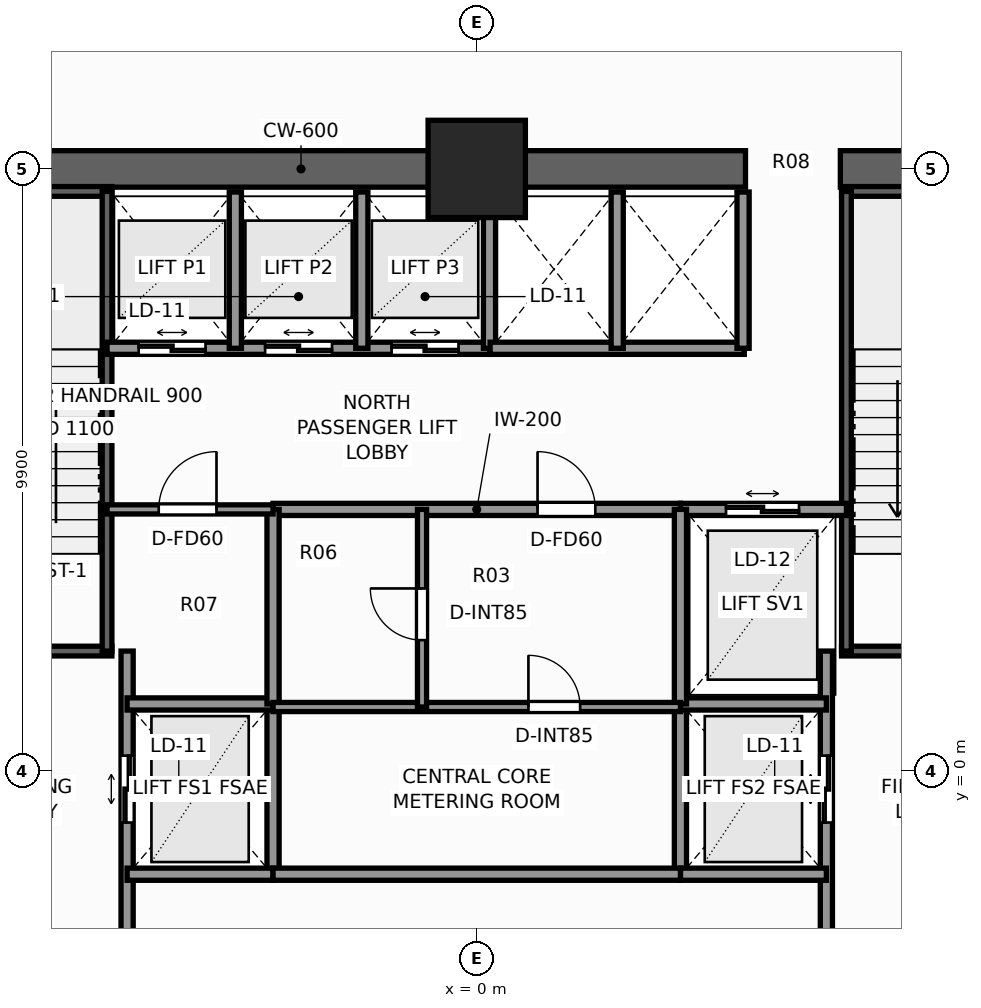
"""IFC4 building model, lengths in metres.
Left out: names, types, materials, properties, quantities, classifications, styles, units other than length and angle.
Written with IfcOpenShell. Run it as: python <this file> out.ifc"""

import sys

from ifc_helpers import new_model, si_unit, direction, frame, frame_2d, origin, origin_2d, place, context, subcontext, project, spatial, rectangle, extrude, element, fill, save


model = new_model("IFC4")
c1 = context("Model", 3, precision=1e-05, world=origin(), true_north=direction((0.0, 1.0)))
c2 = subcontext(c1, "Body", "Model", "MODEL_VIEW")
j1 = project(units=[si_unit("LENGTHUNIT", "METRE"), si_unit("PLANEANGLEUNIT", "RADIAN")], contexts=[c1])
p1 = place(None, origin())
s1 = spatial("IfcSite", under=j1, at=p1, CompositionType="ELEMENT")
p2 = place(p1, origin())
s2 = spatial("IfcBuilding", under=s1, at=p2, CompositionType="ELEMENT")
p3 = place(p2, frame((0.0, 0.0, 5.5)))
s3 = spatial("IfcBuildingStorey", under=s2, at=p3, CompositionType="ELEMENT", Elevation=5.5)
p4 = place(p3, frame((-10.2, 9.9, 0.0), z_axis=(0.0, 0.0, 1.0), x_axis=(1.0, 0.0, 0.0)))
e1 = element("IfcWall", 1, at=p4, inside=s3, PredefinedType="SHEAR", context=c2, shape_type="SweptSolid", body=[
    extrude(rectangle(XDim=14.62, YDim=0.6, at=frame_2d((7.31, 0.0))), origin(), (0.0, 0.0, 1.0), 4.5),
])
p5 = place(p3, frame((5.98, 9.9, 0.0), z_axis=(0.0, 0.0, 1.0), x_axis=(1.0, 0.0, 0.0)))
e2 = element("IfcWall", 2, at=p5, inside=s3, PredefinedType="SHEAR", context=c2, shape_type="SweptSolid", body=[
    extrude(rectangle(XDim=4.22, YDim=0.6, at=frame_2d((2.11, 0.0))), origin(), (0.0, 0.0, 1.0), 4.5),
])
p6 = place(p3, frame((0.0, 9.9, 0.0), z_axis=(0.0, 0.0, 1.0), x_axis=(1.0, 0.0, 0.0)))
e3 = element("IfcColumn", 3, at=p6, inside=s3, PredefinedType="COLUMN", context=c2, shape_type="SweptSolid", body=[
    extrude(rectangle(XDim=1.6, YDim=1.6, at=origin_2d()), origin(), (0.0, 0.0, 1.0), 4.5),
])
p7 = place(p3, frame((-9.52, 1.97, 0.0), z_axis=(0.0, 0.0, 1.0), x_axis=(1.0, 0.0, 0.0)))
e4 = element("IfcWall", 4, at=p7, inside=s3, PredefinedType="SHEAR", context=c2, shape_type="SweptSolid", body=[
    extrude(rectangle(XDim=3.52, YDim=0.16, at=frame_2d((1.76, 0.0))), origin(), (0.0, 0.0, 1.0), 4.5),
])
p8 = place(p7, frame((1.15, 0.0, 0.0)))
e5 = element("IfcOpeningElement", 5, at=p8, cuts=e4, PredefinedType="OPENING", context=c2, shape_type="SweptSolid", body=[
    extrude(rectangle(XDim=1.1, YDim=2.2, at=frame_2d((0.55, 1.1))), frame((0.0, 0.09, 0.0), z_axis=(0.0, -1.0, 0.0), x_axis=(1.0, 0.0, 0.0)), (0.0, 0.0, 1.0), 0.18),
])
p9 = place(p3, frame((-9.52, 9.53, 0.0), z_axis=(0.0, 0.0, 1.0), x_axis=(1.0, 0.0, 0.0)))
e6 = element("IfcWall", 6, at=p9, inside=s3, PredefinedType="SHEAR", context=c2, shape_type="SweptSolid", body=[
    extrude(rectangle(XDim=3.52, YDim=0.16, at=frame_2d((1.76, 0.0))), origin(), (0.0, 0.0, 1.0), 4.5),
])
p10 = place(p3, frame((-6.08, 1.97, 0.0), z_axis=(0.0, 0.0, 1.0), x_axis=(0.0, 1.0, 0.0)))
e7 = element("IfcWall", 7, at=p10, inside=s3, PredefinedType="SHEAR", context=c2, shape_type="SweptSolid", body=[
    extrude(rectangle(XDim=7.56, YDim=0.16, at=frame_2d((3.78, 0.0))), origin(), (0.0, 0.0, 1.0), 4.5),
])
p11 = place(p3, frame((6.0, 1.97, 0.0), z_axis=(0.0, 0.0, 1.0), x_axis=(1.0, 0.0, 0.0)))
e8 = element("IfcWall", 8, at=p11, inside=s3, PredefinedType="SHEAR", context=c2, shape_type="SweptSolid", body=[
    extrude(rectangle(XDim=3.52, YDim=0.16, at=frame_2d((1.76, 0.0))), origin(), (0.0, 0.0, 1.0), 4.5),
])
p12 = place(p11, frame((1.15, 0.0, 0.0)))
e9 = element("IfcOpeningElement", 9, at=p12, cuts=e8, PredefinedType="OPENING", context=c2, shape_type="SweptSolid", body=[
    extrude(rectangle(XDim=1.1, YDim=2.2, at=frame_2d((0.55, 1.1))), frame((0.0, 0.09, 0.0), z_axis=(0.0, -1.0, 0.0), x_axis=(1.0, 0.0, 0.0)), (0.0, 0.0, 1.0), 0.18),
])
p13 = place(p3, frame((6.0, 9.53, 0.0), z_axis=(0.0, 0.0, 1.0), x_axis=(1.0, 0.0, 0.0)))
e10 = element("IfcWall", 10, at=p13, inside=s3, PredefinedType="SHEAR", context=c2, shape_type="SweptSolid", body=[
    extrude(rectangle(XDim=3.52, YDim=0.16, at=frame_2d((1.76, 0.0))), origin(), (0.0, 0.0, 1.0), 4.5),
])
p14 = place(p3, frame((6.08, 1.97, 0.0), z_axis=(0.0, 0.0, 1.0), x_axis=(0.0, 1.0, 0.0)))
e11 = element("IfcWall", 11, at=p14, inside=s3, PredefinedType="SHEAR", context=c2, shape_type="SweptSolid", body=[
    extrude(rectangle(XDim=7.56, YDim=0.16, at=frame_2d((3.78, 0.0))), origin(), (0.0, 0.0, 1.0), 4.5),
])
p15 = place(p3, frame((-5.75, -3.6, 0.0), z_axis=(0.0, 0.0, 1.0), x_axis=(0.0, 1.0, 0.0)))
e12 = element("IfcWall", 12, at=p15, inside=s3, PredefinedType="SOLIDWALL", context=c2, shape_type="SweptSolid", body=[
    extrude(rectangle(XDim=5.57, YDim=0.2, at=frame_2d((2.785, 0.0))), origin(), (0.0, 0.0, 1.0), 4.22),
])
p16 = place(p15, frame((2.75, 0.0, 0.0)))
e13 = element("IfcOpeningElement", 13, at=p16, cuts=e12, PredefinedType="OPENING", context=c2, shape_type="SweptSolid", body=[
    extrude(rectangle(XDim=1.1, YDim=2.2, at=frame_2d((0.55, 1.1))), frame((0.0, 0.11, 0.0), z_axis=(0.0, -1.0, 0.0), x_axis=(1.0, 0.0, 0.0)), (0.0, 0.0, 1.0), 0.22),
])
p17 = place(p3, frame((-3.35, -1.7, 0.0), z_axis=(0.0, 0.0, 1.0), x_axis=(0.0, 1.0, 0.0)))
e14 = element("IfcWall", 14, at=p17, inside=s3, PredefinedType="SOLIDWALL", context=c2, shape_type="SweptSolid", body=[
    extrude(rectangle(XDim=2.8, YDim=0.2, at=frame_2d((1.4, 0.0))), origin(), (0.0, 0.0, 1.0), 4.22),
])
for number, where, z_axis, x_axis in (
    (15, (-5.75, -1.7, 0.0), (0.0, 0.0, 1.0), (1.0, 0.0, 0.0)),
    (16, (-5.75, 1.1, 0.0), (0.0, 0.0, 1.0), (1.0, 0.0, 0.0)),
):
    element("IfcWall", number, at=place(p3, frame(where, z_axis=z_axis, x_axis=x_axis)), inside=s3, PredefinedType="SOLIDWALL", context=c2, shape_type="SweptSolid", body=[
        extrude(rectangle(XDim=2.4, YDim=0.2, at=frame_2d((1.2, 0.0))), origin(), (0.0, 0.0, 1.0), 4.22),
    ])
p18 = place(p3, frame((5.75, -3.6, 0.0), z_axis=(0.0, 0.0, 1.0), x_axis=(0.0, 1.0, 0.0)))
e17 = element("IfcWall", 17, at=p18, inside=s3, PredefinedType="SOLIDWALL", context=c2, shape_type="SweptSolid", body=[
    extrude(rectangle(XDim=5.57, YDim=0.2, at=frame_2d((2.785, 0.0))), origin(), (0.0, 0.0, 1.0), 4.22),
])
p19 = place(p18, frame((2.75, 0.0, 0.0)))
e18 = element("IfcOpeningElement", 18, at=p19, cuts=e17, PredefinedType="OPENING", context=c2, shape_type="SweptSolid", body=[
    extrude(rectangle(XDim=1.1, YDim=2.2, at=frame_2d((0.55, 1.1))), frame((0.0, 0.11, 0.0), z_axis=(0.0, -1.0, 0.0), x_axis=(1.0, 0.0, 0.0)), (0.0, 0.0, 1.0), 0.22),
])
p20 = place(p3, frame((3.35, -1.7, 0.0), z_axis=(0.0, 0.0, 1.0), x_axis=(0.0, 1.0, 0.0)))
e19 = element("IfcWall", 19, at=p20, inside=s3, PredefinedType="SOLIDWALL", context=c2, shape_type="SweptSolid", body=[
    extrude(rectangle(XDim=2.8, YDim=0.2, at=frame_2d((1.4, 0.0))), origin(), (0.0, 0.0, 1.0), 4.22),
])
for number, where, z_axis, x_axis in (
    (20, (3.35, -1.7, 0.0), (0.0, 0.0, 1.0), (1.0, 0.0, 0.0)),
    (21, (3.35, 1.1, 0.0), (0.0, 0.0, 1.0), (1.0, 0.0, 0.0)),
):
    element("IfcWall", number, at=place(p3, frame(where, z_axis=z_axis, x_axis=x_axis)), inside=s3, PredefinedType="SOLIDWALL", context=c2, shape_type="SweptSolid", body=[
        extrude(rectangle(XDim=2.4, YDim=0.2, at=frame_2d((1.2, 0.0))), origin(), (0.0, 0.0, 1.0), 4.22),
    ])
p21 = place(p3, frame((3.35, 4.3, 0.0), z_axis=(0.0, 0.0, 1.0), x_axis=(1.0, 0.0, 0.0)))
e22 = element("IfcWall", 22, at=p21, inside=s3, PredefinedType="SOLIDWALL", context=c2, shape_type="SweptSolid", body=[
    extrude(rectangle(XDim=2.73, YDim=0.2, at=frame_2d((1.365, 0.0))), origin(), (0.0, 0.0, 1.0), 4.22),
])
p22 = place(p21, frame((0.75, 0.0, 0.0)))
e23 = element("IfcOpeningElement", 23, at=p22, cuts=e22, PredefinedType="OPENING", context=c2, shape_type="SweptSolid", body=[
    extrude(rectangle(XDim=1.2, YDim=2.25, at=frame_2d((0.6, 1.125))), frame((0.0, 0.11, 0.0), z_axis=(0.0, -1.0, 0.0), x_axis=(1.0, 0.0, 0.0)), (0.0, 0.0, 1.0), 0.22),
])
p23 = place(p3, frame((-6.08, 6.95, 0.0), z_axis=(0.0, 0.0, 1.0), x_axis=(1.0, 0.0, 0.0)))
e24 = element("IfcWall", 24, at=p23, inside=s3, PredefinedType="SOLIDWALL", context=c2, shape_type="SweptSolid", body=[
    extrude(rectangle(XDim=6.3, YDim=0.2, at=frame_2d((3.15, 0.0))), origin(), (0.0, 0.0, 1.0), 4.22),
])
p24 = place(p23, frame((0.52, 0.0, 0.0)))
e25 = element("IfcOpeningElement", 25, at=p24, cuts=e24, PredefinedType="OPENING", context=c2, shape_type="SweptSolid", body=[
    extrude(rectangle(XDim=1.1, YDim=2.2, at=frame_2d((0.55, 1.1))), frame((0.0, 0.11, 0.0), z_axis=(0.0, -1.0, 0.0), x_axis=(1.0, 0.0, 0.0)), (0.0, 0.0, 1.0), 0.22),
])
p25 = place(p23, frame((2.6, 0.0, 0.0)))
e26 = element("IfcOpeningElement", 26, at=p25, cuts=e24, PredefinedType="OPENING", context=c2, shape_type="SweptSolid", body=[
    extrude(rectangle(XDim=1.1, YDim=2.2, at=frame_2d((0.55, 1.1))), frame((0.0, 0.11, 0.0), z_axis=(0.0, -1.0, 0.0), x_axis=(1.0, 0.0, 0.0)), (0.0, 0.0, 1.0), 0.22),
])
p26 = place(p23, frame((4.68, 0.0, 0.0)))
e27 = element("IfcOpeningElement", 27, at=p26, cuts=e24, PredefinedType="OPENING", context=c2, shape_type="SweptSolid", body=[
    extrude(rectangle(XDim=1.1, YDim=2.2, at=frame_2d((0.55, 1.1))), frame((0.0, 0.11, 0.0), z_axis=(0.0, -1.0, 0.0), x_axis=(1.0, 0.0, 0.0)), (0.0, 0.0, 1.0), 0.22),
])
for number, where, z_axis, x_axis in (
    (28, (-3.97, 6.95, 0.0), (0.0, 0.0, 1.0), (0.0, 1.0, 0.0)),
    (29, (-1.89, 6.95, 0.0), (0.0, 0.0, 1.0), (0.0, 1.0, 0.0)),
    (30, (0.21, 6.95, 0.0), (0.0, 0.0, 1.0), (0.0, 1.0, 0.0)),
):
    element("IfcWall", number, at=place(p3, frame(where, z_axis=z_axis, x_axis=x_axis)), inside=s3, PredefinedType="SOLIDWALL", context=c2, shape_type="SweptSolid", body=[
        extrude(rectangle(XDim=2.57, YDim=0.2, at=frame_2d((1.285, 0.0))), origin(), (0.0, 0.0, 1.0), 4.22),
    ])
p27 = place(p3, frame((0.22, 6.95, 0.0), z_axis=(0.0, 0.0, 1.0), x_axis=(1.0, 0.0, 0.0)))
e31 = element("IfcWall", 31, at=p27, inside=s3, PredefinedType="SOLIDWALL", context=c2, shape_type="SweptSolid", body=[
    extrude(rectangle(XDim=4.18, YDim=0.2, at=frame_2d((2.09, 0.0))), origin(), (0.0, 0.0, 1.0), 4.22),
])
for number, where, z_axis, x_axis in (
    (32, (4.38, 6.95, 0.0), (0.0, 0.0, 1.0), (0.0, 1.0, 0.0)),
    (33, (2.31, 6.95, 0.0), (0.0, 0.0, 1.0), (0.0, 1.0, 0.0)),
):
    element("IfcWall", number, at=place(p3, frame(where, z_axis=z_axis, x_axis=x_axis)), inside=s3, PredefinedType="SOLIDWALL", context=c2, shape_type="SweptSolid", body=[
        extrude(rectangle(XDim=2.57, YDim=0.2, at=frame_2d((1.285, 0.0))), origin(), (0.0, 0.0, 1.0), 4.22),
    ])
p28 = place(p3, frame((-3.35, 4.3, 0.0), z_axis=(0.0, 0.0, 1.0), x_axis=(1.0, 0.0, 0.0)))
e34 = element("IfcWall", 34, at=p28, inside=s3, PredefinedType="SOLIDWALL", context=c2, shape_type="SweptSolid", body=[
    extrude(rectangle(XDim=6.7, YDim=0.2, at=frame_2d((3.35, 0.0))), origin(), (0.0, 0.0, 1.0), 4.22),
])
p29 = place(p28, frame((4.35, 0.0, 0.0)))
e35 = element("IfcOpeningElement", 35, at=p29, cuts=e34, PredefinedType="OPENING", context=c2, shape_type="SweptSolid", body=[
    extrude(rectangle(XDim=0.95, YDim=2.06, at=frame_2d((0.475, 1.03))), frame((0.0, 0.11, 0.0), z_axis=(0.0, -1.0, 0.0), x_axis=(1.0, 0.0, 0.0)), (0.0, 0.0, 1.0), 0.22),
])
p30 = place(p3, frame((-3.35, -1.7, 0.0), z_axis=(0.0, 0.0, 1.0), x_axis=(1.0, 0.0, 0.0)))
e36 = element("IfcWall", 36, at=p30, inside=s3, PredefinedType="SOLIDWALL", context=c2, shape_type="SweptSolid", body=[
    extrude(rectangle(XDim=6.7, YDim=0.2, at=frame_2d((3.35, 0.0))), origin(), (0.0, 0.0, 1.0), 4.22),
])
for number, where, z_axis, x_axis in (
    (37, (-3.35, 1.1, 0.0), (0.0, 0.0, 1.0), (0.0, 1.0, 0.0)),
    (38, (3.35, 1.1, 0.0), (0.0, 0.0, 1.0), (0.0, 1.0, 0.0)),
):
    element("IfcWall", number, at=place(p3, frame(where, z_axis=z_axis, x_axis=x_axis)), inside=s3, PredefinedType="SOLIDWALL", context=c2, shape_type="SweptSolid", body=[
        extrude(rectangle(XDim=3.2, YDim=0.2, at=frame_2d((1.6, 0.0))), origin(), (0.0, 0.0, 1.0), 4.22),
    ])
p31 = place(p3, frame((-3.35, 1.05, 0.0), z_axis=(0.0, 0.0, 1.0), x_axis=(1.0, 0.0, 0.0)))
e39 = element("IfcWall", 39, at=p31, inside=s3, PredefinedType="PARTITIONING", context=c2, shape_type="SweptSolid", body=[
    extrude(rectangle(XDim=6.7, YDim=0.15, at=frame_2d((3.35, 0.0))), origin(), (0.0, 0.0, 1.0), 4.22),
])
p32 = place(p31, frame((4.2, 0.0, 0.0)))
e40 = element("IfcOpeningElement", 40, at=p32, cuts=e39, PredefinedType="OPENING", context=c2, shape_type="SweptSolid", body=[
    extrude(rectangle(XDim=0.85, YDim=2.03, at=frame_2d((0.425, 1.015))), frame((0.0, 0.085, 0.0), z_axis=(0.0, -1.0, 0.0), x_axis=(1.0, 0.0, 0.0)), (0.0, 0.0, 1.0), 0.17),
])
p33 = place(p3, frame((-0.9, 1.05, 0.0), z_axis=(0.0, 0.0, 1.0), x_axis=(0.0, 1.0, 0.0)))
e41 = element("IfcWall", 41, at=p33, inside=s3, PredefinedType="PARTITIONING", context=c2, shape_type="SweptSolid", body=[
    extrude(rectangle(XDim=3.25, YDim=0.15, at=frame_2d((1.625, 0.0))), origin(), (0.0, 0.0, 1.0), 4.22),
])
p34 = place(p33, frame((1.1, 0.0, 0.0)))
e42 = element("IfcOpeningElement", 42, at=p34, cuts=e41, PredefinedType="OPENING", context=c2, shape_type="SweptSolid", body=[
    extrude(rectangle(XDim=0.85, YDim=2.03, at=frame_2d((0.425, 1.015))), frame((0.0, 0.085, 0.0), z_axis=(0.0, -1.0, 0.0), x_axis=(1.0, 0.0, 0.0)), (0.0, 0.0, 1.0), 0.17),
])
p35 = place(p3, frame((-6.08, 4.3, 0.0), z_axis=(0.0, 0.0, 1.0), x_axis=(1.0, 0.0, 0.0)))
e43 = element("IfcWall", 43, at=p35, inside=s3, PredefinedType="PARTITIONING", context=c2, shape_type="SweptSolid", body=[
    extrude(rectangle(XDim=2.73, YDim=0.15, at=frame_2d((1.365, 0.0))), origin(), (0.0, 0.0, 1.0), 4.22),
])
p36 = place(p35, frame((0.85, 0.0, 0.0)))
e44 = element("IfcOpeningElement", 44, at=p36, cuts=e43, PredefinedType="OPENING", context=c2, shape_type="SweptSolid", body=[
    extrude(rectangle(XDim=0.95, YDim=2.06, at=frame_2d((0.475, 1.03))), frame((0.0, 0.085, 0.0), z_axis=(0.0, -1.0, 0.0), x_axis=(1.0, 0.0, 0.0)), (0.0, 0.0, 1.0), 0.17),
])
p37 = place(p16, origin())
e45 = element("IfcDoor", 45, at=p37, inside=s3, OperationType="DOUBLE_DOOR_SLIDING", PredefinedType="DOOR", context=c2, shape_type="SweptSolid", body=[
    extrude(rectangle(XDim=1.1, YDim=2.2, at=frame_2d((0.55, 1.1))), frame((0.0, 0.025, 0.0), z_axis=(0.0, -1.0, 0.0), x_axis=(1.0, 0.0, 0.0)), (0.0, 0.0, 1.0), 0.05),
])
fill(e13, e45)
p38 = place(p19, origin())
e46 = element("IfcDoor", 46, at=p38, inside=s3, OperationType="DOUBLE_DOOR_SLIDING", PredefinedType="DOOR", context=c2, shape_type="SweptSolid", body=[
    extrude(rectangle(XDim=1.1, YDim=2.2, at=frame_2d((0.55, 1.1))), frame((0.0, 0.025, 0.0), z_axis=(0.0, -1.0, 0.0), x_axis=(1.0, 0.0, 0.0)), (0.0, 0.0, 1.0), 0.05),
])
fill(e18, e46)
p39 = place(p22, origin())
e47 = element("IfcDoor", 47, at=p39, inside=s3, OperationType="DOUBLE_DOOR_SLIDING", PredefinedType="DOOR", context=c2, shape_type="SweptSolid", body=[
    extrude(rectangle(XDim=1.2, YDim=2.25, at=frame_2d((0.6, 1.125))), frame((0.0, 0.025, 0.0), z_axis=(0.0, -1.0, 0.0), x_axis=(1.0, 0.0, 0.0)), (0.0, 0.0, 1.0), 0.05),
])
fill(e23, e47)
p40 = place(p24, origin())
e48 = element("IfcDoor", 48, at=p40, inside=s3, OperationType="DOUBLE_DOOR_SLIDING", PredefinedType="DOOR", context=c2, shape_type="SweptSolid", body=[
    extrude(rectangle(XDim=1.1, YDim=2.2, at=frame_2d((0.55, 1.1))), frame((0.0, 0.025, 0.0), z_axis=(0.0, -1.0, 0.0), x_axis=(1.0, 0.0, 0.0)), (0.0, 0.0, 1.0), 0.05),
])
fill(e25, e48)
p41 = place(p25, origin())
e49 = element("IfcDoor", 49, at=p41, inside=s3, OperationType="DOUBLE_DOOR_SLIDING", PredefinedType="DOOR", context=c2, shape_type="SweptSolid", body=[
    extrude(rectangle(XDim=1.1, YDim=2.2, at=frame_2d((0.55, 1.1))), frame((0.0, 0.025, 0.0), z_axis=(0.0, -1.0, 0.0), x_axis=(1.0, 0.0, 0.0)), (0.0, 0.0, 1.0), 0.05),
])
fill(e26, e49)
p42 = place(p26, origin())
e50 = element("IfcDoor", 50, at=p42, inside=s3, OperationType="DOUBLE_DOOR_SLIDING", PredefinedType="DOOR", context=c2, shape_type="SweptSolid", body=[
    extrude(rectangle(XDim=1.1, YDim=2.2, at=frame_2d((0.55, 1.1))), frame((0.0, 0.025, 0.0), z_axis=(0.0, -1.0, 0.0), x_axis=(1.0, 0.0, 0.0)), (0.0, 0.0, 1.0), 0.05),
])
fill(e27, e50)
p43 = place(p29, origin())
e51 = element("IfcDoor", 51, at=p43, inside=s3, OperationType="SINGLE_SWING_LEFT", PredefinedType="DOOR", context=c2, shape_type="SweptSolid", body=[
    extrude(rectangle(XDim=0.95, YDim=2.06, at=frame_2d((0.475, 1.03))), frame((0.0, 0.025, 0.0), z_axis=(0.0, -1.0, 0.0), x_axis=(1.0, 0.0, 0.0)), (0.0, 0.0, 1.0), 0.05),
])
fill(e35, e51)
p44 = place(p32, origin())
e52 = element("IfcDoor", 52, at=p44, inside=s3, OperationType="SINGLE_SWING_LEFT", PredefinedType="DOOR", context=c2, shape_type="SweptSolid", body=[
    extrude(rectangle(XDim=0.85, YDim=2.03, at=frame_2d((0.425, 1.015))), frame((0.0, 0.025, 0.0), z_axis=(0.0, -1.0, 0.0), x_axis=(1.0, 0.0, 0.0)), (0.0, 0.0, 1.0), 0.05),
])
fill(e40, e52)
p45 = place(p34, origin())
e53 = element("IfcDoor", 53, at=p45, inside=s3, OperationType="SINGLE_SWING_RIGHT", PredefinedType="DOOR", context=c2, shape_type="SweptSolid", body=[
    extrude(rectangle(XDim=0.85, YDim=2.03, at=frame_2d((0.425, 1.015))), frame((0.0, 0.025, 0.0), z_axis=(0.0, -1.0, 0.0), x_axis=(1.0, 0.0, 0.0)), (0.0, 0.0, 1.0), 0.05),
])
fill(e42, e53)
p46 = place(p36, origin())
e54 = element("IfcDoor", 54, at=p46, inside=s3, OperationType="SINGLE_SWING_RIGHT", PredefinedType="DOOR", context=c2, shape_type="SweptSolid", body=[
    extrude(rectangle(XDim=0.95, YDim=2.06, at=frame_2d((0.475, 1.03))), frame((0.0, 0.025, 0.0), z_axis=(0.0, -1.0, 0.0), x_axis=(1.0, 0.0, 0.0)), (0.0, 0.0, 1.0), 0.05),
])
fill(e44, e54)
save(model, sys.argv[1])
